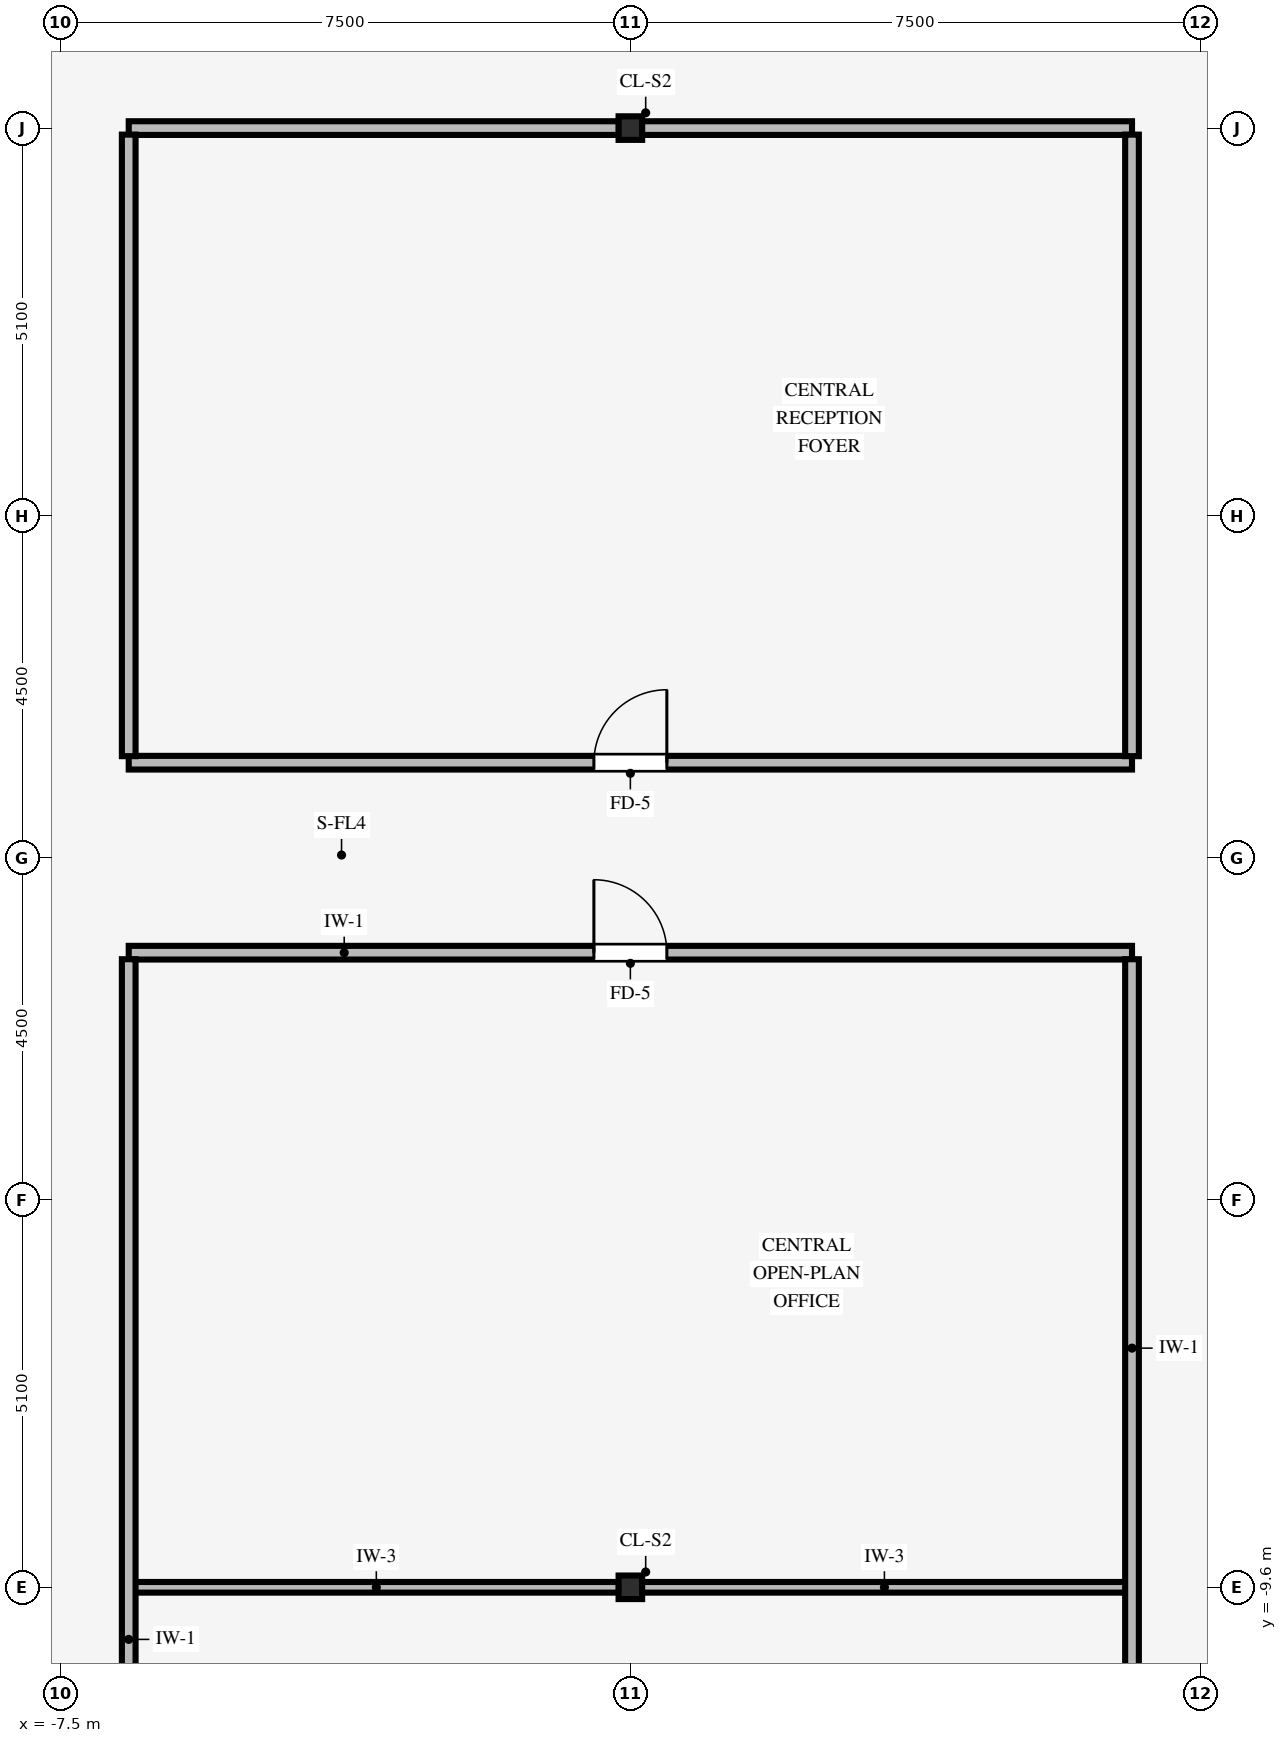
"""IFC4 building model, lengths in metres.
Left out: names, types, materials, properties, quantities, classifications, styles, units other than length and angle.
Written with IfcOpenShell. Run it as: python <this file> out.ifc"""

import sys

from ifc_helpers import new_model, si_unit, direction, frame, frame_2d, origin, origin_2d, place, context, subcontext, project, spatial, rectangle, i_section, extrude, source, transform, mapped, element, fill, save


model = new_model("IFC4")
c1 = context("Model", 3, precision=1e-05, world=origin(), true_north=direction((0.0, 1.0)))
c2 = subcontext(c1, "Body", "Model", "MODEL_VIEW")
j1 = project(units=[si_unit("LENGTHUNIT", "METRE"), si_unit("PLANEANGLEUNIT", "RADIAN")], contexts=[c1])
p1 = place(None, origin())
s1 = spatial("IfcSite", under=j1, at=p1, CompositionType="ELEMENT")
p2 = place(p1, origin())
s2 = spatial("IfcBuilding", under=s1, at=p2, CompositionType="ELEMENT")
p3 = place(p2, frame((0.0, 0.0, 227.4)))
s3 = spatial("IfcBuildingStorey", under=s2, at=p3, CompositionType="ELEMENT", Elevation=227.4)
for number, where, z_axis, x_axis in (
    (1, (0.0, -9.6, 0.0), (0.0, 0.0, 1.0), (1.0, 0.0, 0.0)),
    (2, (0.0, 9.6, 0.0), (0.0, 0.0, 1.0), (1.0, 0.0, 0.0)),
):
    element("IfcColumn", number, at=place(p3, frame(where, z_axis=z_axis, x_axis=x_axis)), inside=s3, PredefinedType="COLUMN", context=c2, shape_type="SweptSolid", body=[
        extrude(i_section(OverallWidth=0.31, OverallDepth=0.31, WebThickness=0.015, FlangeThickness=0.015, FilletRadius=0.015, at=origin_2d()), origin(), (0.0, 0.0, 1.0), 3.37),
    ])
for number, where, z_axis, x_axis in (
    (3, (-6.534, -9.6, 0.0), (0.0, 0.0, 1.0), (1.0, 0.0, 0.0)),
    (4, (0.151, -9.6, 0.0), (0.0, 0.0, 1.0), (1.0, 0.0, 0.0)),
):
    element("IfcWall", number, at=place(p3, frame(where, z_axis=z_axis, x_axis=x_axis)), inside=s3, PredefinedType="PARTITIONING", context=c2, shape_type="SweptSolid", body=[
        extrude(rectangle(XDim=6.383, YDim=0.14, at=frame_2d((3.191, 0.0))), origin(), (0.0, 0.0, 1.0), 2.405),
    ])
p4 = place(p3, frame((-6.6, -1.25, 0.0), z_axis=(0.0, 0.0, 1.0), x_axis=(1.0, 0.0, 0.0)))
e5 = element("IfcWall", 5, at=p4, inside=s3, PredefinedType="PARTITIONING", context=c2, shape_type="SweptSolid", body=[
    extrude(rectangle(XDim=13.2, YDim=0.18, at=frame_2d((6.6, 0.0))), origin(), (0.0, 0.0, 1.0), 3.36),
])
p5 = place(p4, frame((6.12, 0.0, 0.0)))
e6 = element("IfcOpeningElement", 6, at=p5, cuts=e5, PredefinedType="OPENING", context=c2, shape_type="SweptSolid", body=[
    extrude(rectangle(XDim=0.96, YDim=2.1, at=frame_2d((0.48, 1.05))), frame((0.0, 0.1, 0.0), z_axis=(0.0, -1.0, 0.0), x_axis=(1.0, 0.0, 0.0)), (0.0, 0.0, 1.0), 0.2),
])
p6 = place(p3, frame((-6.6, 1.25, 0.0), z_axis=(0.0, 0.0, 1.0), x_axis=(1.0, 0.0, 0.0)))
e7 = element("IfcWall", 7, at=p6, inside=s3, PredefinedType="PARTITIONING", context=c2, shape_type="SweptSolid", body=[
    extrude(rectangle(XDim=13.2, YDim=0.18, at=frame_2d((6.6, 0.0))), origin(), (0.0, 0.0, 1.0), 3.36),
])
p7 = place(p6, frame((6.12, 0.0, 0.0)))
e8 = element("IfcOpeningElement", 8, at=p7, cuts=e7, PredefinedType="OPENING", context=c2, shape_type="SweptSolid", body=[
    extrude(rectangle(XDim=0.96, YDim=2.1, at=frame_2d((0.48, 1.05))), frame((0.0, 0.1, 0.0), z_axis=(0.0, -1.0, 0.0), x_axis=(1.0, 0.0, 0.0)), (0.0, 0.0, 1.0), 0.2),
])
for number, where, z_axis, x_axis in (
    (9, (-6.6, 9.6, 0.0), (0.0, 0.0, 1.0), (1.0, 0.0, 0.0)),
    (10, (0.151, 9.6, 0.0), (0.0, 0.0, 1.0), (1.0, 0.0, 0.0)),
):
    element("IfcWall", number, at=place(p3, frame(where, z_axis=z_axis, x_axis=x_axis)), inside=s3, PredefinedType="PARTITIONING", context=c2, shape_type="SweptSolid", body=[
        extrude(rectangle(XDim=6.449, YDim=0.18, at=frame_2d((3.225, 0.0))), origin(), (0.0, 0.0, 1.0), 2.405),
    ])
p8 = place(p3, frame((-6.6, -19.235, 0.0), z_axis=(0.0, 0.0, 1.0), x_axis=(0.0, 1.0, 0.0)))
e11 = element("IfcWall", 11, at=p8, inside=s3, PredefinedType="PARTITIONING", context=c2, shape_type="SweptSolid", body=[
    extrude(rectangle(XDim=17.899, YDim=0.18, at=frame_2d((8.95, 0.0))), origin(), (0.0, 0.0, 1.0), 3.36),
])
p9 = place(p3, frame((-6.6, 1.336, 0.0), z_axis=(0.0, 0.0, 1.0), x_axis=(0.0, 1.0, 0.0)))
e12 = element("IfcWall", 12, at=p9, inside=s3, PredefinedType="PARTITIONING", context=c2, shape_type="SweptSolid", body=[
    extrude(rectangle(XDim=8.178, YDim=0.18, at=frame_2d((4.089, 0.0))), origin(), (0.0, 0.0, 1.0), 3.36),
])
p10 = place(p3, frame((6.6, -19.1, 0.0), z_axis=(0.0, 0.0, 1.0), x_axis=(0.0, 1.0, 0.0)))
e13 = element("IfcWall", 13, at=p10, inside=s3, PredefinedType="PARTITIONING", context=c2, shape_type="SweptSolid", body=[
    extrude(rectangle(XDim=17.764, YDim=0.18, at=frame_2d((8.882, 0.0))), origin(), (0.0, 0.0, 1.0), 3.36),
])
p11 = place(p10, frame((6.12, 0.0, 0.0)))
e14 = element("IfcOpeningElement", 14, at=p11, cuts=e13, PredefinedType="OPENING", context=c2, shape_type="SweptSolid", body=[
    extrude(rectangle(XDim=0.96, YDim=2.1, at=frame_2d((0.48, 1.05))), frame((0.0, 0.1, 0.0), z_axis=(0.0, -1.0, 0.0), x_axis=(1.0, 0.0, 0.0)), (0.0, 0.0, 1.0), 0.2),
])
p12 = place(p3, frame((6.6, 1.336, 0.0), z_axis=(0.0, 0.0, 1.0), x_axis=(0.0, 1.0, 0.0)))
e15 = element("IfcWall", 15, at=p12, inside=s3, PredefinedType="PARTITIONING", context=c2, shape_type="SweptSolid", body=[
    extrude(rectangle(XDim=8.178, YDim=0.18, at=frame_2d((4.089, 0.0))), origin(), (0.0, 0.0, 1.0), 3.36),
])
m1 = source(origin(), c2, "Body", "SweptSolid", [
    extrude(rectangle(XDim=0.96, YDim=2.1, at=frame_2d((0.48, 1.05))), frame((0.0, 0.025, 0.0), z_axis=(0.0, -1.0, 0.0), x_axis=(1.0, 0.0, 0.0)), (0.0, 0.0, 1.0), 0.05),
])
p13 = place(p7, origin())
e16 = element("IfcDoor", 16, at=p13, inside=s3, OperationType="SINGLE_SWING_RIGHT", PredefinedType="DOOR", context=c2, shape_type="MappedRepresentation", body=[
    mapped(m1, transform((0.0, 0.0, 0.0), scale=1.0)),
])
fill(e8, e16)
p14 = place(p5, origin())
e17 = element("IfcDoor", 17, at=p14, inside=s3, OperationType="SINGLE_SWING_LEFT", PredefinedType="DOOR", context=c2, shape_type="MappedRepresentation", body=[
    mapped(m1, transform((0.0, 0.0, 0.0), scale=1.0)),
])
fill(e6, e17)
save(model, sys.argv[1])
